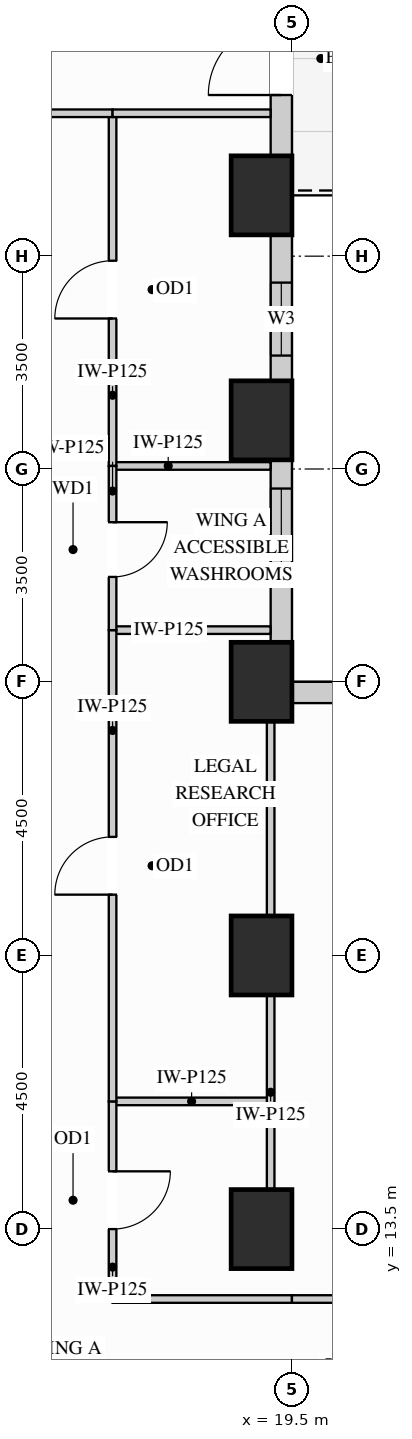
"""IFC4 building model, lengths in metres.
Left out: names, types, materials, properties, quantities, classifications, styles, units other than length and angle.
Written with IfcOpenShell. Run it as: python <this file> out.ifc"""

import sys

from ifc_helpers import new_model, si_unit, direction, frame, frame_2d, origin, origin_2d, place, context, subcontext, project, spatial, rectangle, extrude, source, transform, mapped, element, fill, save


model = new_model("IFC4")
c1 = context("Model", 3, precision=1e-05, world=origin(), true_north=direction((0.0, 1.0)))
c2 = subcontext(c1, "Body", "Model", "MODEL_VIEW")
j1 = project(units=[si_unit("LENGTHUNIT", "METRE"), si_unit("PLANEANGLEUNIT", "RADIAN")], contexts=[c1])
p1 = place(None, origin())
s1 = spatial("IfcSite", under=j1, at=p1, CompositionType="ELEMENT")
p2 = place(p1, origin())
s2 = spatial("IfcBuilding", under=s1, at=p2, CompositionType="ELEMENT")
p3 = place(p2, frame((0.0, 0.0, 69.3)))
s3 = spatial("IfcBuildingStorey", under=s2, at=p3, CompositionType="ELEMENT", Elevation=69.3)
m1 = source(origin(), c2, "Body", "SweptSolid", [
    extrude(rectangle(XDim=1.0, YDim=1.3, at=origin_2d()), origin(), (0.0, 0.0, 1.0), 3.32),
])
for number, where, z_axis, x_axis in (
    (1, (19.0, 13.5, 0.0), (0.0, 0.0, 1.0), (1.0, 0.0, 0.0)),
    (2, (19.0, 18.0, 0.0), (0.0, 0.0, 1.0), (1.0, 0.0, 0.0)),
    (3, (19.0, 22.5, 0.0), (0.0, 0.0, 1.0), (1.0, 0.0, 0.0)),
    (4, (19.0, 26.8, 0.0), (0.0, 0.0, 1.0), (1.0, 0.0, 0.0)),
    (5, (19.0, 30.5, 0.0), (0.0, 0.0, 1.0), (1.0, 0.0, 0.0)),
):
    element("IfcColumn", number, at=place(p3, frame(where, z_axis=z_axis, x_axis=x_axis)), inside=s3, PredefinedType="COLUMN", context=c2, shape_type="MappedRepresentation", body=[
        mapped(m1, transform((0.0, 0.0, 0.0), x_axis=(1.0, 0.0, 0.0), y_axis=(0.0, 1.0, 0.0), z_axis=(0.0, 0.0, 1.0))),
    ])
p4 = place(p3, frame((34.352, 22.325, 0.0), z_axis=(0.0, 0.0, 1.0), x_axis=(-1.0, 0.0, 0.0)))
e6 = element("IfcWall", 6, at=p4, inside=s3, PredefinedType="SOLIDWALL", context=c2, shape_type="SweptSolid", body=[
    extrude(rectangle(XDim=14.854, YDim=0.35, at=frame_2d((7.427, 0.0))), origin(), (0.0, 0.0, 1.0), 3.305),
])
p5 = place(p4, frame((4.058, 0.0, 0.78)))
e7 = element("IfcOpeningElement", 7, at=p5, cuts=e6, PredefinedType="OPENING", context=c2, shape_type="SweptSolid", body=[
    extrude(rectangle(XDim=1.5, YDim=2.0, at=frame_2d((0.75, 1.0))), frame((0.0, 0.185, 0.0), z_axis=(0.0, -1.0, 0.0), x_axis=(1.0, 0.0, 0.0)), (0.0, 0.0, 1.0), 0.37),
])
p6 = place(p4, frame((9.296, 0.0, 0.78)))
e8 = element("IfcOpeningElement", 8, at=p6, cuts=e6, PredefinedType="OPENING", context=c2, shape_type="SweptSolid", body=[
    extrude(rectangle(XDim=1.5, YDim=2.0, at=frame_2d((0.75, 1.0))), frame((0.0, 0.185, 0.0), z_axis=(0.0, -1.0, 0.0), x_axis=(1.0, 0.0, 0.0)), (0.0, 0.0, 1.0), 0.37),
])
p7 = place(p3, frame((19.325, 23.148, 0.0), z_axis=(0.0, 0.0, 1.0), x_axis=(0.0, 1.0, 0.0)))
e9 = element("IfcWall", 9, at=p7, inside=s3, PredefinedType="SOLIDWALL", context=c2, shape_type="SweptSolid", body=[
    extrude(rectangle(XDim=3.004, YDim=0.35, at=frame_2d((1.502, 0.0))), origin(), (0.0, 0.0, 1.0), 2.45),
])
p8 = place(p7, frame((1.031, 0.0, 0.78)))
e10 = element("IfcOpeningElement", 10, at=p8, cuts=e9, PredefinedType="OPENING", context=c2, shape_type="SweptSolid", body=[
    extrude(rectangle(XDim=1.5, YDim=1.49, at=frame_2d((0.75, 0.745))), frame((0.0, 0.185, 0.0), z_axis=(0.0, -1.0, 0.0), x_axis=(1.0, 0.0, 0.0)), (0.0, 0.0, 1.0), 0.37),
])
p9 = place(p3, frame((19.325, 27.448, 0.0), z_axis=(0.0, 0.0, 1.0), x_axis=(0.0, 1.0, 0.0)))
e11 = element("IfcWall", 11, at=p9, inside=s3, PredefinedType="SOLIDWALL", context=c2, shape_type="SweptSolid", body=[
    extrude(rectangle(XDim=2.404, YDim=0.35, at=frame_2d((1.202, 0.0))), origin(), (0.0, 0.0, 1.0), 2.45),
])
p10 = place(p9, frame((0.417, 0.0, 0.78)))
e12 = element("IfcOpeningElement", 12, at=p10, cuts=e11, PredefinedType="OPENING", context=c2, shape_type="SweptSolid", body=[
    extrude(rectangle(XDim=1.2, YDim=1.49, at=frame_2d((0.6, 0.745))), frame((0.0, 0.185, 0.0), z_axis=(0.0, -1.0, 0.0), x_axis=(1.0, 0.0, 0.0)), (0.0, 0.0, 1.0), 0.37),
])
p11 = place(p3, frame((19.325, 31.148, 0.0), z_axis=(0.0, 0.0, 1.0), x_axis=(0.0, 1.0, 0.0)))
e13 = element("IfcWall", 13, at=p11, inside=s3, PredefinedType="SOLIDWALL", context=c2, shape_type="SweptSolid", body=[
    extrude(rectangle(XDim=3.204, YDim=0.35, at=frame_2d((1.602, 0.0))), origin(), (0.0, 0.0, 1.0), 2.45),
])
p12 = place(p11, frame((1.002, 0.0, 0.0)))
e14 = element("IfcOpeningElement", 14, at=p12, cuts=e13, PredefinedType="OPENING", context=c2, shape_type="SweptSolid", body=[
    extrude(rectangle(XDim=1.2, YDim=2.15, at=frame_2d((0.6, 1.075))), frame((0.0, 0.185, 0.0), z_axis=(0.0, -1.0, 0.0), x_axis=(1.0, 0.0, 0.0)), (0.0, 0.0, 1.0), 0.37),
])
m2 = source(origin(), c2, "Body", "SweptSolid", [
    extrude(rectangle(XDim=2.6, YDim=0.125, at=frame_2d((1.3, 0.0))), origin(), (0.0, 0.0, 1.0), 3.305),
])
p13 = place(p3, frame((16.55, 15.6, 0.0), z_axis=(0.0, 0.0, 1.0), x_axis=(1.0, 0.0, 0.0)))
e15 = element("IfcWall", 15, at=p13, inside=s3, PredefinedType="PARTITIONING", context=c2, shape_type="MappedRepresentation", body=[
    mapped(m2, transform((0.0, 0.0, 0.0), x_axis=(1.0, 0.0, 0.0), y_axis=(0.0, 1.0, 0.0), z_axis=(0.0, 0.0, 1.0))),
])
m3 = source(origin(), c2, "Body", "SweptSolid", [
    extrude(rectangle(XDim=2.598, YDim=0.125, at=frame_2d((1.299, 0.0))), origin(), (0.0, 0.0, 1.0), 3.305),
])
for number, where, z_axis, x_axis in (
    (16, (16.55, 23.35, 0.0), (0.0, 0.0, 1.0), (1.0, 0.0, 0.0)),
    (17, (16.55, 26.05, 0.0), (0.0, 0.0, 1.0), (1.0, 0.0, 0.0)),
):
    element("IfcWall", number, at=place(p3, frame(where, z_axis=z_axis, x_axis=x_axis)), inside=s3, PredefinedType="PARTITIONING", context=c2, shape_type="MappedRepresentation", body=[
        mapped(m3, transform((0.0, 0.0, 0.0), x_axis=(1.0, 0.0, 0.0), y_axis=(0.0, 1.0, 0.0), z_axis=(0.0, 0.0, 1.0))),
    ])
m4 = source(origin(), c2, "Body", "SweptSolid", [
    extrude(rectangle(XDim=3.18, YDim=0.125, at=frame_2d((1.59, 0.0))), origin(), (0.0, 0.0, 1.0), 2.61),
])
for number, where, z_axis, x_axis in (
    (18, (19.15, 14.16, 0.0), (0.0, 0.0, 1.0), (0.0, 1.0, 0.0)),
    (19, (19.15, 18.66, 0.0), (0.0, 0.0, 1.0), (0.0, 1.0, 0.0)),
):
    element("IfcWall", number, at=place(p3, frame(where, z_axis=z_axis, x_axis=x_axis)), inside=s3, PredefinedType="PARTITIONING", context=c2, shape_type="MappedRepresentation", body=[
        mapped(m4, transform((0.0, 0.0, 0.0), x_axis=(1.0, 0.0, 0.0), y_axis=(0.0, 1.0, 0.0), z_axis=(0.0, 0.0, 1.0))),
    ])
p14 = place(p3, frame((16.55, 12.35, 0.0), z_axis=(0.0, 0.0, 1.0), x_axis=(0.0, 1.0, 0.0)))
e20 = element("IfcWall", 20, at=p14, inside=s3, PredefinedType="PARTITIONING", context=c2, shape_type="SweptSolid", body=[
    extrude(rectangle(XDim=3.25, YDim=0.125, at=frame_2d((1.625, 0.0))), origin(), (0.0, 0.0, 1.0), 3.305),
])
p15 = place(p14, frame((1.15, 0.0, 0.0)))
e21 = element("IfcOpeningElement", 21, at=p15, cuts=e20, PredefinedType="OPENING", context=c2, shape_type="SweptSolid", body=[
    extrude(rectangle(XDim=0.95, YDim=2.15, at=frame_2d((0.475, 1.075))), frame((0.0, 0.073, 0.0), z_axis=(0.0, -1.0, 0.0), x_axis=(1.0, 0.0, 0.0)), (0.0, 0.0, 1.0), 0.145),
])
p16 = place(p3, frame((16.55, 15.6, 0.0), z_axis=(0.0, 0.0, 1.0), x_axis=(0.0, 1.0, 0.0)))
e22 = element("IfcWall", 22, at=p16, inside=s3, PredefinedType="PARTITIONING", context=c2, shape_type="SweptSolid", body=[
    extrude(rectangle(XDim=7.75, YDim=0.125, at=frame_2d((3.875, 0.0))), origin(), (0.0, 0.0, 1.0), 3.305),
])
p17 = place(p16, frame((3.4, 0.0, 0.0)))
e23 = element("IfcOpeningElement", 23, at=p17, cuts=e22, PredefinedType="OPENING", context=c2, shape_type="SweptSolid", body=[
    extrude(rectangle(XDim=0.95, YDim=2.15, at=frame_2d((0.475, 1.075))), frame((0.0, 0.073, 0.0), z_axis=(0.0, -1.0, 0.0), x_axis=(1.0, 0.0, 0.0)), (0.0, 0.0, 1.0), 0.145),
])
p18 = place(p3, frame((16.55, 26.05, 0.0), z_axis=(0.0, 0.0, 1.0), x_axis=(0.0, 1.0, 0.0)))
e24 = element("IfcWall", 24, at=p18, inside=s3, PredefinedType="PARTITIONING", context=c2, shape_type="SweptSolid", body=[
    extrude(rectangle(XDim=5.8, YDim=0.125, at=frame_2d((2.9, 0.0))), origin(), (0.0, 0.0, 1.0), 3.305),
])
p19 = place(p18, frame((2.425, 0.0, 0.0)))
e25 = element("IfcOpeningElement", 25, at=p19, cuts=e24, PredefinedType="OPENING", context=c2, shape_type="SweptSolid", body=[
    extrude(rectangle(XDim=0.95, YDim=2.15, at=frame_2d((0.475, 1.075))), frame((0.0, 0.073, 0.0), z_axis=(0.0, -1.0, 0.0), x_axis=(1.0, 0.0, 0.0)), (0.0, 0.0, 1.0), 0.145),
])
p20 = place(p3, frame((16.55, 23.35, 0.0), z_axis=(0.0, 0.0, 1.0), x_axis=(0.0, 1.0, 0.0)))
e26 = element("IfcWall", 26, at=p20, inside=s3, PredefinedType="PARTITIONING", context=c2, shape_type="SweptSolid", body=[
    extrude(rectangle(XDim=2.7, YDim=0.125, at=frame_2d((1.35, 0.0))), origin(), (0.0, 0.0, 1.0), 3.305),
])
p21 = place(p20, frame((0.875, 0.0, 0.0)))
e27 = element("IfcOpeningElement", 27, at=p21, cuts=e26, PredefinedType="OPENING", context=c2, shape_type="SweptSolid", body=[
    extrude(rectangle(XDim=0.9, YDim=2.15, at=frame_2d((0.45, 1.075))), frame((0.0, 0.073, 0.0), z_axis=(0.0, -1.0, 0.0), x_axis=(1.0, 0.0, 0.0)), (0.0, 0.0, 1.0), 0.145),
])
p22 = place(p3, frame((2.45, 31.85, 0.0), z_axis=(0.0, 0.0, 1.0), x_axis=(1.0, 0.0, 0.0)))
e28 = element("IfcWall", 28, at=p22, inside=s3, PredefinedType="PARTITIONING", context=c2, shape_type="SweptSolid", body=[
    extrude(rectangle(XDim=14.1, YDim=0.125, at=frame_2d((7.05, 0.0))), origin(), (0.0, 0.0, 1.0), 2.768),
])
p23 = place(p22, frame((6.575, 0.0, 0.0)))
e29 = element("IfcOpeningElement", 29, at=p23, cuts=e28, PredefinedType="OPENING", context=c2, shape_type="SweptSolid", body=[
    extrude(rectangle(XDim=0.95, YDim=2.15, at=frame_2d((0.475, 1.075))), frame((0.0, 0.073, 0.0), z_axis=(0.0, -1.0, 0.0), x_axis=(1.0, 0.0, 0.0)), (0.0, 0.0, 1.0), 0.145),
])
m5 = source(origin(), c2, "Body", "SweptSolid", [
    extrude(rectangle(XDim=2.598, YDim=0.125, at=frame_2d((1.299, 0.0))), origin(), (0.0, 0.0, 1.0), 2.768),
])
p24 = place(p3, frame((16.55, 31.85, 0.0), z_axis=(0.0, 0.0, 1.0), x_axis=(1.0, 0.0, 0.0)))
e30 = element("IfcWall", 30, at=p24, inside=s3, PredefinedType="PARTITIONING", context=c2, shape_type="MappedRepresentation", body=[
    mapped(m5, transform((0.0, 0.0, 0.0), x_axis=(1.0, 0.0, 0.0), y_axis=(0.0, 1.0, 0.0), z_axis=(0.0, 0.0, 1.0))),
])
m6 = source(origin(), c2, "Body", "SweptSolid", [
    extrude(rectangle(XDim=2.95, YDim=0.125, at=frame_2d((1.475, 0.0))), origin(), (0.0, 0.0, 1.0), 3.305),
])
p25 = place(p3, frame((16.55, 12.35, 0.0), z_axis=(0.0, 0.0, 1.0), x_axis=(1.0, 0.0, 0.0)))
e31 = element("IfcWall", 31, at=p25, inside=s3, PredefinedType="PARTITIONING", context=c2, shape_type="MappedRepresentation", body=[
    mapped(m6, transform((0.0, 0.0, 0.0), x_axis=(1.0, 0.0, 0.0), y_axis=(0.0, 1.0, 0.0), z_axis=(0.0, 0.0, 1.0))),
])
p26 = place(p3, frame((19.5, 12.35, 0.0), z_axis=(0.0, 0.0, 1.0), x_axis=(1.0, 0.0, 0.0)))
e32 = element("IfcWall", 32, at=p26, inside=s3, PredefinedType="PARTITIONING", context=c2, shape_type="SweptSolid", body=[
    extrude(rectangle(XDim=4.55, YDim=0.125, at=frame_2d((2.275, 0.0))), origin(), (0.0, 0.0, 1.0), 3.305),
])
p27 = place(p26, frame((1.8, 0.0, 0.0)))
e33 = element("IfcOpeningElement", 33, at=p27, cuts=e32, PredefinedType="OPENING", context=c2, shape_type="SweptSolid", body=[
    extrude(rectangle(XDim=0.95, YDim=2.15, at=frame_2d((0.475, 1.075))), frame((0.0, 0.073, 0.0), z_axis=(0.0, -1.0, 0.0), x_axis=(1.0, 0.0, 0.0)), (0.0, 0.0, 1.0), 0.145),
])
m7 = source(origin(), c2, "Body", "SweptSolid", [
    extrude(rectangle(XDim=1.2, YDim=2.15, at=frame_2d((0.6, 1.075))), frame((0.0, 0.025, 0.0), z_axis=(0.0, -1.0, 0.0), x_axis=(1.0, 0.0, 0.0)), (0.0, 0.0, 1.0), 0.05),
])
p28 = place(p12, frame((1.2, 0.0, 0.0), z_axis=(0.0, 0.0, 1.0), x_axis=(-1.0, 0.0, 0.0)))
e34 = element("IfcDoor", 34, at=p28, inside=s3, OperationType="SINGLE_SWING_LEFT", PredefinedType="DOOR", context=c2, shape_type="MappedRepresentation", body=[
    mapped(m7, transform((0.0, 0.0, 0.0), x_axis=(1.0, 0.0, 0.0), y_axis=(0.0, 1.0, 0.0), z_axis=(0.0, 0.0, 1.0))),
])
fill(e14, e34)
m8 = source(origin(), c2, "Body", "SweptSolid", [
    extrude(rectangle(XDim=0.95, YDim=2.15, at=frame_2d((0.475, 1.075))), frame((0.0, 0.025, 0.0), z_axis=(0.0, -1.0, 0.0), x_axis=(1.0, 0.0, 0.0)), (0.0, 0.0, 1.0), 0.05),
])
p29 = place(p15, origin())
e35 = element("IfcDoor", 35, at=p29, inside=s3, OperationType="SINGLE_SWING_RIGHT", PredefinedType="DOOR", context=c2, shape_type="MappedRepresentation", body=[
    mapped(m8, transform((0.0, 0.0, 0.0), x_axis=(1.0, 0.0, 0.0), y_axis=(0.0, 1.0, 0.0), z_axis=(0.0, 0.0, 1.0))),
])
fill(e21, e35)
p30 = place(p17, origin())
e36 = element("IfcDoor", 36, at=p30, inside=s3, OperationType="SINGLE_SWING_LEFT", PredefinedType="DOOR", context=c2, shape_type="MappedRepresentation", body=[
    mapped(m8, transform((0.0, 0.0, 0.0), x_axis=(1.0, 0.0, 0.0), y_axis=(0.0, 1.0, 0.0), z_axis=(0.0, 0.0, 1.0))),
])
fill(e23, e36)
p31 = place(p19, origin())
e37 = element("IfcDoor", 37, at=p31, inside=s3, OperationType="SINGLE_SWING_LEFT", PredefinedType="DOOR", context=c2, shape_type="MappedRepresentation", body=[
    mapped(m8, transform((0.0, 0.0, 0.0), x_axis=(1.0, 0.0, 0.0), y_axis=(0.0, 1.0, 0.0), z_axis=(0.0, 0.0, 1.0))),
])
fill(e25, e37)
m9 = source(origin(), c2, "Body", "SweptSolid", [
    extrude(rectangle(XDim=0.9, YDim=2.15, at=frame_2d((0.45, 1.075))), frame((0.0, 0.025, 0.0), z_axis=(0.0, -1.0, 0.0), x_axis=(1.0, 0.0, 0.0)), (0.0, 0.0, 1.0), 0.05),
])
p32 = place(p21, origin())
e38 = element("IfcDoor", 38, at=p32, inside=s3, OperationType="SINGLE_SWING_RIGHT", PredefinedType="DOOR", context=c2, shape_type="MappedRepresentation", body=[
    mapped(m9, transform((0.0, 0.0, 0.0), x_axis=(1.0, 0.0, 0.0), y_axis=(0.0, 1.0, 0.0), z_axis=(0.0, 0.0, 1.0))),
])
fill(e27, e38)
m10 = source(origin(), c2, "Body", "SweptSolid", [
    extrude(rectangle(XDim=1.2, YDim=1.49, at=frame_2d((0.6, 0.745))), frame((0.0, 0.03, 0.0), z_axis=(0.0, -1.0, 0.0), x_axis=(1.0, 0.0, 0.0)), (0.0, 0.0, 1.0), 0.06),
])
p33 = place(p10, origin())
e39 = element("IfcWindow", 39, at=p33, inside=s3, PartitioningType="SINGLE_PANEL", PredefinedType="WINDOW", context=c2, shape_type="MappedRepresentation", body=[
    mapped(m10, transform((0.0, 0.0, 0.0), x_axis=(1.0, 0.0, 0.0), y_axis=(0.0, 1.0, 0.0), z_axis=(0.0, 0.0, 1.0))),
])
fill(e12, e39)
m11 = source(origin(), c2, "Body", "SweptSolid", [
    extrude(rectangle(XDim=1.5, YDim=1.49, at=frame_2d((0.75, 0.745))), frame((0.0, 0.03, 0.0), z_axis=(0.0, -1.0, 0.0), x_axis=(1.0, 0.0, 0.0)), (0.0, 0.0, 1.0), 0.06),
])
p34 = place(p8, origin())
e40 = element("IfcWindow", 40, at=p34, inside=s3, PartitioningType="SINGLE_PANEL", PredefinedType="WINDOW", context=c2, shape_type="MappedRepresentation", body=[
    mapped(m11, transform((0.0, 0.0, 0.0), x_axis=(1.0, 0.0, 0.0), y_axis=(0.0, 1.0, 0.0), z_axis=(0.0, 0.0, 1.0))),
])
fill(e10, e40)
save(model, sys.argv[1])
